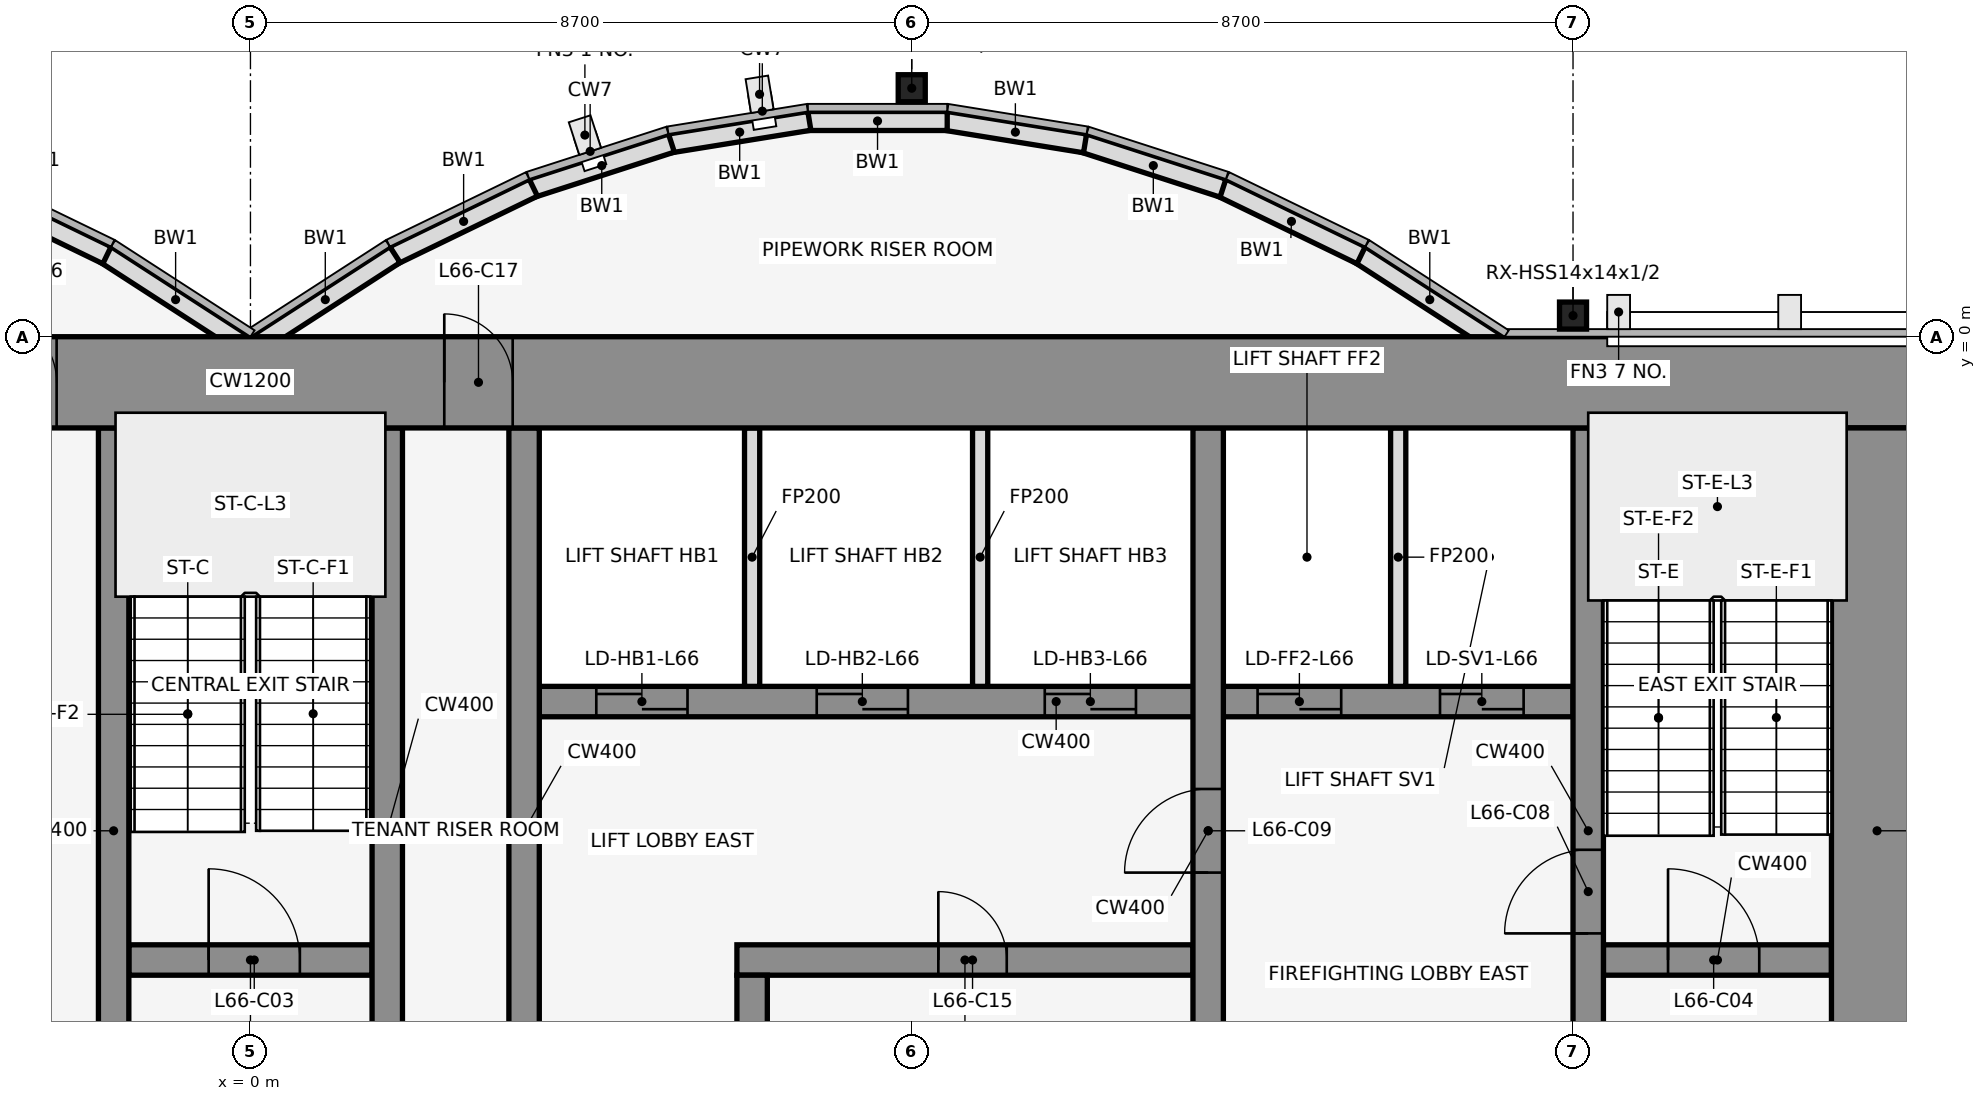
"""IFC4 building model, lengths in metres.
Left out: names, types, materials, properties, quantities, classifications, styles, units other than length and angle.
Written with IfcOpenShell. Run it as: python <this file> out.ifc"""

import sys

from ifc_helpers import new_model, si_unit, direction, frame, frame_2d, origin, origin_2d, place, context, subcontext, project, spatial, rectangle, hollow_rectangle, extrude, element, fill, save


model = new_model("IFC4")
c1 = context("Model", 3, precision=1e-05, world=origin(), true_north=direction((0.0, 1.0)))
c2 = subcontext(c1, "Body", "Model", "MODEL_VIEW")
j1 = project(units=[si_unit("LENGTHUNIT", "METRE"), si_unit("PLANEANGLEUNIT", "RADIAN")], contexts=[c1])
p1 = place(None, origin())
s1 = spatial("IfcSite", under=j1, at=p1, CompositionType="ELEMENT")
p2 = place(p1, origin())
s2 = spatial("IfcBuilding", under=s1, at=p2, CompositionType="ELEMENT")
p3 = place(p2, frame((0.0, 0.0, 293.0)))
s3 = spatial("IfcBuildingStorey", under=s2, at=p3, CompositionType="ELEMENT", Elevation=293.0)
for number, where, z_axis, x_axis in (
    (1, (8.7, 3.269, 0.0), (0.0, 0.0, 1.0), (1.0, 0.0, 0.0)),
    (2, (17.4, 0.278, 0.0), (0.0, 0.0, 1.0), (1.0, 0.0, 0.0)),
):
    element("IfcColumn", number, at=place(p3, frame(where, z_axis=z_axis, x_axis=x_axis)), inside=s3, PredefinedType="COLUMN", context=c2, shape_type="SweptSolid", body=[
        extrude(hollow_rectangle(XDim=0.356, YDim=0.356, WallThickness=0.012, at=origin_2d()), origin(), (0.0, 0.0, 1.0), 4.5),
    ])
p4 = place(p3, frame((16.432, -0.105, 0.0), z_axis=(0.0, 0.0, 1.0), x_axis=(-0.83981312244, 0.542875602121, 0.0)))
e3 = element("IfcWall", 3, at=p4, inside=s3, PredefinedType="STANDARD", context=c2, shape_type="SweptSolid", body=[
    extrude(rectangle(XDim=2.183, YDim=0.25, at=frame_2d((1.091, 0.0))), origin(), (0.0, 0.0, 1.0), 4.35),
])
p5 = place(p3, frame((14.612, 1.073, 0.0), z_axis=(0.0, 0.0, 1.0), x_axis=(-0.89982408427, 0.436252928206, 0.0)))
e4 = element("IfcWall", 4, at=p5, inside=s3, PredefinedType="STANDARD", context=c2, shape_type="SweptSolid", body=[
    extrude(rectangle(XDim=2.038, YDim=0.25, at=frame_2d((1.019, 0.0))), origin(), (0.0, 0.0, 1.0), 4.35),
])
p6 = place(p3, frame((12.795, 1.955, 0.0), z_axis=(0.0, 0.0, 1.0), x_axis=(-0.951495806175, 0.307661714928, 0.0)))
e5 = element("IfcWall", 5, at=p6, inside=s3, PredefinedType="STANDARD", context=c2, shape_type="SweptSolid", body=[
    extrude(rectangle(XDim=1.927, YDim=0.25, at=frame_2d((0.963, 0.0))), origin(), (0.0, 0.0, 1.0), 4.35),
])
p7 = place(p3, frame((10.98, 2.543, 0.0), z_axis=(0.0, 0.0, 1.0), x_axis=(-0.987181718931, 0.159600293885, 0.0)))
e6 = element("IfcWall", 6, at=p7, inside=s3, PredefinedType="STANDARD", context=c2, shape_type="SweptSolid", body=[
    extrude(rectangle(XDim=1.857, YDim=0.25, at=frame_2d((0.929, 0.0))), origin(), (0.0, 0.0, 1.0), 4.35),
])
p8 = place(p3, frame((9.167, 2.838, 0.0), z_axis=(0.0, 0.0, 1.0), x_axis=(-1.0, 0.0, 0.0)))
e7 = element("IfcWall", 7, at=p8, inside=s3, PredefinedType="STANDARD", context=c2, shape_type="SweptSolid", body=[
    extrude(rectangle(XDim=1.833, YDim=0.25, at=frame_2d((0.917, 0.0))), origin(), (0.0, 0.0, 1.0), 4.35),
])
p9 = place(p3, frame((7.353, 2.84, 0.0), z_axis=(0.0, 0.0, 1.0), x_axis=(-0.987181718931, -0.159600293885, 0.0)))
e8 = element("IfcWall", 8, at=p9, inside=s3, PredefinedType="STANDARD", context=c2, shape_type="SweptSolid", body=[
    extrude(rectangle(XDim=1.857, YDim=0.25, at=frame_2d((0.929, 0.0))), origin(), (0.0, 0.0, 1.0), 4.35),
])
p10 = place(p3, frame((5.538, 2.548, 0.0), z_axis=(0.0, 0.0, 1.0), x_axis=(-0.951495806175, -0.307661714928, 0.0)))
e9 = element("IfcWall", 9, at=p10, inside=s3, PredefinedType="STANDARD", context=c2, shape_type="SweptSolid", body=[
    extrude(rectangle(XDim=1.927, YDim=0.25, at=frame_2d((0.963, 0.0))), origin(), (0.0, 0.0, 1.0), 4.35),
])
p11 = place(p3, frame((3.721, 1.962, 0.0), z_axis=(0.0, 0.0, 1.0), x_axis=(-0.89982408427, -0.436252928206, 0.0)))
e10 = element("IfcWall", 10, at=p11, inside=s3, PredefinedType="STANDARD", context=c2, shape_type="SweptSolid", body=[
    extrude(rectangle(XDim=2.038, YDim=0.25, at=frame_2d((1.019, 0.0))), origin(), (0.0, 0.0, 1.0), 4.35),
])
for number, where, z_axis, x_axis in (
    (11, (1.901, 1.08, 0.0), (0.0, 0.0, 1.0), (-0.84, -0.543, 0.0)),
    (12, (-0.068, -0.105, 0.0), (0.0, 0.0, 1.0), (-0.84, 0.543, 0.0)),
):
    element("IfcWall", number, at=place(p3, frame(where, z_axis=z_axis, x_axis=x_axis)), inside=s3, PredefinedType="STANDARD", context=c2, shape_type="SweptSolid", body=[
        extrude(rectangle(XDim=2.183, YDim=0.25, at=frame_2d((1.091, 0.0))), origin(), (0.0, 0.0, 1.0), 4.35),
    ])
p12 = place(p3, frame((-1.888, 1.073, 0.0), z_axis=(0.0, 0.0, 1.0), x_axis=(-0.89982408427, 0.436252928206, 0.0)))
e13 = element("IfcWall", 13, at=p12, inside=s3, PredefinedType="STANDARD", context=c2, shape_type="SweptSolid", body=[
    extrude(rectangle(XDim=2.038, YDim=0.25, at=frame_2d((1.019, 0.0))), origin(), (0.0, 0.0, 1.0), 4.35),
])
p13 = place(p3, frame((-1.6, -8.2, 0.0), z_axis=(0.0, 0.0, 1.0), x_axis=(1.0, 0.0, 0.0)))
e14 = element("IfcWall", 14, at=p13, inside=s3, PredefinedType="SHEAR", context=c2, shape_type="SweptSolid", body=[
    extrude(rectangle(XDim=3.2, YDim=0.4, at=frame_2d((1.6, 0.0))), origin(), (0.0, 0.0, 1.0), 4.5),
])
p14 = place(p13, frame((1.05, 0.0, 0.0)))
e15 = element("IfcOpeningElement", 15, at=p14, cuts=e14, PredefinedType="OPENING", context=c2, shape_type="SweptSolid", body=[
    extrude(rectangle(XDim=1.2, YDim=2.1, at=frame_2d((0.6, 1.05))), frame((0.0, 0.212, 0.0), z_axis=(0.0, -1.0, 0.0), x_axis=(1.0, 0.0, 0.0)), (0.0, 0.0, 1.0), 0.424),
])
p15 = place(p3, frame((6.4, -8.2, 0.0), z_axis=(0.0, 0.0, 1.0), x_axis=(1.0, 0.0, 0.0)))
e16 = element("IfcWall", 16, at=p15, inside=s3, PredefinedType="SHEAR", context=c2, shape_type="SweptSolid", body=[
    extrude(rectangle(XDim=6.0, YDim=0.4, at=frame_2d((3.0, 0.0))), origin(), (0.0, 0.0, 1.0), 4.5),
])
p16 = place(p15, frame((2.65, 0.0, 0.0)))
e17 = element("IfcOpeningElement", 17, at=p16, cuts=e16, PredefinedType="OPENING", context=c2, shape_type="SweptSolid", body=[
    extrude(rectangle(XDim=0.9, YDim=2.1, at=frame_2d((0.45, 1.05))), frame((0.0, 0.212, 0.0), z_axis=(0.0, -1.0, 0.0), x_axis=(1.0, 0.0, 0.0)), (0.0, 0.0, 1.0), 0.424),
])
p17 = place(p3, frame((17.8, -8.2, 0.0), z_axis=(0.0, 0.0, 1.0), x_axis=(1.0, 0.0, 0.0)))
e18 = element("IfcWall", 18, at=p17, inside=s3, PredefinedType="SHEAR", context=c2, shape_type="SweptSolid", body=[
    extrude(rectangle(XDim=3.0, YDim=0.4, at=frame_2d((1.5, 0.0))), origin(), (0.0, 0.0, 1.0), 4.5),
])
p18 = place(p17, frame((0.85, 0.0, 0.0)))
e19 = element("IfcOpeningElement", 19, at=p18, cuts=e18, PredefinedType="OPENING", context=c2, shape_type="SweptSolid", body=[
    extrude(rectangle(XDim=1.2, YDim=2.1, at=frame_2d((0.6, 1.05))), frame((0.0, 0.212, 0.0), z_axis=(0.0, -1.0, 0.0), x_axis=(1.0, 0.0, 0.0)), (0.0, 0.0, 1.0), 0.424),
])
p19 = place(p3, frame((3.8, -4.8, 0.0), z_axis=(0.0, 0.0, 1.0), x_axis=(1.0, 0.0, 0.0)))
e20 = element("IfcWall", 20, at=p19, inside=s3, PredefinedType="SHEAR", context=c2, shape_type="SweptSolid", body=[
    extrude(rectangle(XDim=13.6, YDim=0.4, at=frame_2d((6.8, 0.0))), origin(), (0.0, 0.0, 1.0), 4.5),
])
p20 = place(p19, frame((0.75, 0.0, 0.0)))
e21 = element("IfcOpeningElement", 21, at=p20, cuts=e20, PredefinedType="OPENING", context=c2, shape_type="SweptSolid", body=[
    extrude(rectangle(XDim=1.2, YDim=2.1, at=frame_2d((0.6, 1.05))), frame((0.0, 0.212, 0.0), z_axis=(0.0, -1.0, 0.0), x_axis=(1.0, 0.0, 0.0)), (0.0, 0.0, 1.0), 0.424),
])
p21 = place(p19, frame((3.65, 0.0, 0.0)))
e22 = element("IfcOpeningElement", 22, at=p21, cuts=e20, PredefinedType="OPENING", context=c2, shape_type="SweptSolid", body=[
    extrude(rectangle(XDim=1.2, YDim=2.1, at=frame_2d((0.6, 1.05))), frame((0.0, 0.212, 0.0), z_axis=(0.0, -1.0, 0.0), x_axis=(1.0, 0.0, 0.0)), (0.0, 0.0, 1.0), 0.424),
])
p22 = place(p19, frame((6.65, 0.0, 0.0)))
e23 = element("IfcOpeningElement", 23, at=p22, cuts=e20, PredefinedType="OPENING", context=c2, shape_type="SweptSolid", body=[
    extrude(rectangle(XDim=1.2, YDim=2.1, at=frame_2d((0.6, 1.05))), frame((0.0, 0.212, 0.0), z_axis=(0.0, -1.0, 0.0), x_axis=(1.0, 0.0, 0.0)), (0.0, 0.0, 1.0), 0.424),
])
p23 = place(p19, frame((9.45, 0.0, 0.0)))
e24 = element("IfcOpeningElement", 24, at=p23, cuts=e20, PredefinedType="OPENING", context=c2, shape_type="SweptSolid", body=[
    extrude(rectangle(XDim=1.1, YDim=2.1, at=frame_2d((0.55, 1.05))), frame((0.0, 0.212, 0.0), z_axis=(0.0, -1.0, 0.0), x_axis=(1.0, 0.0, 0.0)), (0.0, 0.0, 1.0), 0.424),
])
p24 = place(p19, frame((11.85, 0.0, 0.0)))
e25 = element("IfcOpeningElement", 25, at=p24, cuts=e20, PredefinedType="OPENING", context=c2, shape_type="SweptSolid", body=[
    extrude(rectangle(XDim=1.1, YDim=2.1, at=frame_2d((0.55, 1.05))), frame((0.0, 0.212, 0.0), z_axis=(0.0, -1.0, 0.0), x_axis=(1.0, 0.0, 0.0)), (0.0, 0.0, 1.0), 0.424),
])
for number, where, z_axis, x_axis in (
    (26, (-1.8, -11.8, 0.0), (0.0, 0.0, 1.0), (0.0, 1.0, 0.0)),
    (27, (1.8, -11.8, 0.0), (0.0, 0.0, 1.0), (0.0, 1.0, 0.0)),
):
    element("IfcWall", number, at=place(p3, frame(where, z_axis=z_axis, x_axis=x_axis)), inside=s3, PredefinedType="SHEAR", context=c2, shape_type="SweptSolid", body=[
        extrude(rectangle(XDim=10.6, YDim=0.4, at=frame_2d((5.3, 0.0))), origin(), (0.0, 0.0, 1.0), 4.5),
    ])
p25 = place(p3, frame((3.6, -11.8, 0.0), z_axis=(0.0, 0.0, 1.0), x_axis=(0.0, 1.0, 0.0)))
e28 = element("IfcWall", 28, at=p25, inside=s3, PredefinedType="SHEAR", context=c2, shape_type="SweptSolid", body=[
    extrude(rectangle(XDim=10.6, YDim=0.4, at=frame_2d((5.3, 0.0))), origin(), (0.0, 0.0, 1.0), 4.5),
])
p26 = place(p25, frame((1.35, 0.0, 0.0)))
e29 = element("IfcOpeningElement", 29, at=p26, cuts=e28, PredefinedType="OPENING", context=c2, shape_type="SweptSolid", body=[
    extrude(rectangle(XDim=0.9, YDim=2.1, at=frame_2d((0.45, 1.05))), frame((0.0, 0.212, 0.0), z_axis=(0.0, -1.0, 0.0), x_axis=(1.0, 0.0, 0.0)), (0.0, 0.0, 1.0), 0.424),
])
p27 = place(p3, frame((6.6, -11.8, 0.0), z_axis=(0.0, 0.0, 1.0), x_axis=(0.0, 1.0, 0.0)))
e30 = element("IfcWall", 30, at=p27, inside=s3, PredefinedType="SHEAR", context=c2, shape_type="SweptSolid", body=[
    extrude(rectangle(XDim=3.4, YDim=0.4, at=frame_2d((1.7, 0.0))), origin(), (0.0, 0.0, 1.0), 4.5),
])
for number, where, z_axis, x_axis in (
    (31, (6.6, -4.6, 0.0), (0.0, 0.0, 1.0), (0.0, 1.0, 0.0)),
    (32, (9.6, -4.6, 0.0), (0.0, 0.0, 1.0), (0.0, 1.0, 0.0)),
):
    element("IfcWall", number, at=place(p3, frame(where, z_axis=z_axis, x_axis=x_axis)), inside=s3, PredefinedType="PARTITIONING", context=c2, shape_type="SweptSolid", body=[
        extrude(rectangle(XDim=3.4, YDim=0.2, at=frame_2d((1.7, 0.0))), origin(), (0.0, 0.0, 1.0), 3.418),
    ])
p28 = place(p3, frame((12.6, -11.8, 0.0), z_axis=(0.0, 0.0, 1.0), x_axis=(0.0, 1.0, 0.0)))
e33 = element("IfcWall", 33, at=p28, inside=s3, PredefinedType="SHEAR", context=c2, shape_type="SweptSolid", body=[
    extrude(rectangle(XDim=10.6, YDim=0.4, at=frame_2d((5.3, 0.0))), origin(), (0.0, 0.0, 1.0), 4.5),
])
p29 = place(p28, frame((4.75, 0.0, 0.0)))
e34 = element("IfcOpeningElement", 34, at=p29, cuts=e33, PredefinedType="OPENING", context=c2, shape_type="SweptSolid", body=[
    extrude(rectangle(XDim=1.1, YDim=2.1, at=frame_2d((0.55, 1.05))), frame((0.0, 0.212, 0.0), z_axis=(0.0, -1.0, 0.0), x_axis=(1.0, 0.0, 0.0)), (0.0, 0.0, 1.0), 0.424),
])
p30 = place(p3, frame((15.1, -4.6, 0.0), z_axis=(0.0, 0.0, 1.0), x_axis=(0.0, 1.0, 0.0)))
e35 = element("IfcWall", 35, at=p30, inside=s3, PredefinedType="PARTITIONING", context=c2, shape_type="SweptSolid", body=[
    extrude(rectangle(XDim=3.4, YDim=0.2, at=frame_2d((1.7, 0.0))), origin(), (0.0, 0.0, 1.0), 3.418),
])
p31 = place(p3, frame((17.6, -11.8, 0.0), z_axis=(0.0, 0.0, 1.0), x_axis=(0.0, 1.0, 0.0)))
e36 = element("IfcWall", 36, at=p31, inside=s3, PredefinedType="SHEAR", context=c2, shape_type="SweptSolid", body=[
    extrude(rectangle(XDim=10.6, YDim=0.4, at=frame_2d((5.3, 0.0))), origin(), (0.0, 0.0, 1.0), 4.5),
])
p32 = place(p31, frame((1.25, 0.0, 0.0)))
e37 = element("IfcOpeningElement", 37, at=p32, cuts=e36, PredefinedType="OPENING", context=c2, shape_type="SweptSolid", body=[
    extrude(rectangle(XDim=1.1, YDim=2.1, at=frame_2d((0.55, 1.05))), frame((0.0, 0.212, 0.0), z_axis=(0.0, -1.0, 0.0), x_axis=(1.0, 0.0, 0.0)), (0.0, 0.0, 1.0), 0.424),
])
p33 = place(p31, frame((3.95, 0.0, 0.0)))
e38 = element("IfcOpeningElement", 38, at=p33, cuts=e36, PredefinedType="OPENING", context=c2, shape_type="SweptSolid", body=[
    extrude(rectangle(XDim=1.1, YDim=2.1, at=frame_2d((0.55, 1.05))), frame((0.0, 0.212, 0.0), z_axis=(0.0, -1.0, 0.0), x_axis=(1.0, 0.0, 0.0)), (0.0, 0.0, 1.0), 0.424),
])
p34 = place(p3, frame((-22.0, -0.6, 0.0), z_axis=(0.0, 0.0, 1.0), x_axis=(1.0, 0.0, 0.0)))
e39 = element("IfcWall", 39, at=p34, inside=s3, PredefinedType="SHEAR", context=c2, shape_type="SweptSolid", body=[
    extrude(rectangle(XDim=44.0, YDim=1.2, at=frame_2d((22.0, 0.0))), origin(), (0.0, 0.0, 1.0), 4.5),
])
p35 = place(p34, frame((18.55, 0.0, 0.0)))
e40 = element("IfcOpeningElement", 40, at=p35, cuts=e39, PredefinedType="OPENING", context=c2, shape_type="SweptSolid", body=[
    extrude(rectangle(XDim=0.9, YDim=2.1, at=frame_2d((0.45, 1.05))), frame((0.0, 0.612, 0.0), z_axis=(0.0, -1.0, 0.0), x_axis=(1.0, 0.0, 0.0)), (0.0, 0.0, 1.0), 1.224),
])
p36 = place(p34, frame((24.55, 0.0, 0.0)))
e41 = element("IfcOpeningElement", 41, at=p36, cuts=e39, PredefinedType="OPENING", context=c2, shape_type="SweptSolid", body=[
    extrude(rectangle(XDim=0.9, YDim=2.1, at=frame_2d((0.45, 1.05))), frame((0.0, 0.612, 0.0), z_axis=(0.0, -1.0, 0.0), x_axis=(1.0, 0.0, 0.0)), (0.0, 0.0, 1.0), 1.224),
])
p37 = place(p3, frame((21.4, -11.8, 0.0), z_axis=(0.0, 0.0, 1.0), x_axis=(0.0, 1.0, 0.0)))
e42 = element("IfcWall", 42, at=p37, inside=s3, PredefinedType="SHEAR", context=c2, shape_type="SweptSolid", body=[
    extrude(rectangle(XDim=10.6, YDim=1.2, at=frame_2d((5.3, 0.0))), origin(), (0.0, 0.0, 1.0), 4.5),
])
p38 = place(p14, origin())
e43 = element("IfcDoor", 43, at=p38, inside=s3, OperationType="SINGLE_SWING_LEFT", PredefinedType="DOOR", context=c2, shape_type="SweptSolid", body=[
    extrude(rectangle(XDim=1.2, YDim=2.1, at=frame_2d((0.6, 1.05))), frame((0.0, 0.025, 0.0), z_axis=(0.0, -1.0, 0.0), x_axis=(1.0, 0.0, 0.0)), (0.0, 0.0, 1.0), 0.05),
])
fill(e15, e43)
p39 = place(p18, origin())
e44 = element("IfcDoor", 44, at=p39, inside=s3, OperationType="SINGLE_SWING_RIGHT", PredefinedType="DOOR", context=c2, shape_type="SweptSolid", body=[
    extrude(rectangle(XDim=1.2, YDim=2.1, at=frame_2d((0.6, 1.05))), frame((0.0, 0.025, 0.0), z_axis=(0.0, -1.0, 0.0), x_axis=(1.0, 0.0, 0.0)), (0.0, 0.0, 1.0), 0.05),
])
fill(e19, e44)
p40 = place(p20, origin())
e45 = element("IfcDoor", 45, at=p40, inside=s3, OperationType="DOUBLE_DOOR_SLIDING", PredefinedType="DOOR", context=c2, shape_type="SweptSolid", body=[
    extrude(rectangle(XDim=1.2, YDim=2.1, at=frame_2d((0.6, 1.05))), frame((0.0, 0.025, 0.0), z_axis=(0.0, -1.0, 0.0), x_axis=(1.0, 0.0, 0.0)), (0.0, 0.0, 1.0), 0.05),
])
fill(e21, e45)
p41 = place(p21, origin())
e46 = element("IfcDoor", 46, at=p41, inside=s3, OperationType="DOUBLE_DOOR_SLIDING", PredefinedType="DOOR", context=c2, shape_type="SweptSolid", body=[
    extrude(rectangle(XDim=1.2, YDim=2.1, at=frame_2d((0.6, 1.05))), frame((0.0, 0.025, 0.0), z_axis=(0.0, -1.0, 0.0), x_axis=(1.0, 0.0, 0.0)), (0.0, 0.0, 1.0), 0.05),
])
fill(e22, e46)
p42 = place(p22, origin())
e47 = element("IfcDoor", 47, at=p42, inside=s3, OperationType="DOUBLE_DOOR_SLIDING", PredefinedType="DOOR", context=c2, shape_type="SweptSolid", body=[
    extrude(rectangle(XDim=1.2, YDim=2.1, at=frame_2d((0.6, 1.05))), frame((0.0, 0.025, 0.0), z_axis=(0.0, -1.0, 0.0), x_axis=(1.0, 0.0, 0.0)), (0.0, 0.0, 1.0), 0.05),
])
fill(e23, e47)
p43 = place(p23, origin())
e48 = element("IfcDoor", 48, at=p43, inside=s3, OperationType="DOUBLE_DOOR_SLIDING", PredefinedType="DOOR", context=c2, shape_type="SweptSolid", body=[
    extrude(rectangle(XDim=1.1, YDim=2.1, at=frame_2d((0.55, 1.05))), frame((0.0, 0.025, 0.0), z_axis=(0.0, -1.0, 0.0), x_axis=(1.0, 0.0, 0.0)), (0.0, 0.0, 1.0), 0.05),
])
fill(e24, e48)
p44 = place(p24, origin())
e49 = element("IfcDoor", 49, at=p44, inside=s3, OperationType="DOUBLE_DOOR_SLIDING", PredefinedType="DOOR", context=c2, shape_type="SweptSolid", body=[
    extrude(rectangle(XDim=1.1, YDim=2.1, at=frame_2d((0.55, 1.05))), frame((0.0, 0.025, 0.0), z_axis=(0.0, -1.0, 0.0), x_axis=(1.0, 0.0, 0.0)), (0.0, 0.0, 1.0), 0.05),
])
fill(e25, e49)
p45 = place(p33, origin())
e50 = element("IfcDoor", 50, at=p45, inside=s3, OperationType="SINGLE_SWING_RIGHT", PredefinedType="DOOR", context=c2, shape_type="SweptSolid", body=[
    extrude(rectangle(XDim=1.1, YDim=2.1, at=frame_2d((0.55, 1.05))), frame((0.0, 0.025, 0.0), z_axis=(0.0, -1.0, 0.0), x_axis=(1.0, 0.0, 0.0)), (0.0, 0.0, 1.0), 0.05),
])
fill(e38, e50)
p46 = place(p29, frame((1.1, 0.0, 0.0), z_axis=(0.0, 0.0, 1.0), x_axis=(-1.0, 0.0, 0.0)))
e51 = element("IfcDoor", 51, at=p46, inside=s3, OperationType="SINGLE_SWING_RIGHT", PredefinedType="DOOR", context=c2, shape_type="SweptSolid", body=[
    extrude(rectangle(XDim=1.1, YDim=2.1, at=frame_2d((0.55, 1.05))), frame((0.0, 0.025, 0.0), z_axis=(0.0, -1.0, 0.0), x_axis=(1.0, 0.0, 0.0)), (0.0, 0.0, 1.0), 0.05),
])
fill(e34, e51)
p47 = place(p16, frame((0.9, 0.0, 0.0), z_axis=(0.0, 0.0, 1.0), x_axis=(-1.0, 0.0, 0.0)))
e52 = element("IfcDoor", 52, at=p47, inside=s3, OperationType="SINGLE_SWING_RIGHT", PredefinedType="DOOR", context=c2, shape_type="SweptSolid", body=[
    extrude(rectangle(XDim=0.9, YDim=2.1, at=frame_2d((0.45, 1.05))), frame((0.0, 0.025, 0.0), z_axis=(0.0, -1.0, 0.0), x_axis=(1.0, 0.0, 0.0)), (0.0, 0.0, 1.0), 0.05),
])
fill(e17, e52)
p48 = place(p35, origin())
e53 = element("IfcDoor", 53, at=p48, inside=s3, OperationType="SINGLE_SWING_LEFT", PredefinedType="DOOR", context=c2, shape_type="SweptSolid", body=[
    extrude(rectangle(XDim=0.9, YDim=2.1, at=frame_2d((0.45, 1.05))), frame((0.0, 0.025, 0.0), z_axis=(0.0, -1.0, 0.0), x_axis=(1.0, 0.0, 0.0)), (0.0, 0.0, 1.0), 0.05),
])
fill(e40, e53)
p49 = place(p36, origin())
e54 = element("IfcDoor", 54, at=p49, inside=s3, OperationType="SINGLE_SWING_LEFT", PredefinedType="DOOR", context=c2, shape_type="SweptSolid", body=[
    extrude(rectangle(XDim=0.9, YDim=2.1, at=frame_2d((0.45, 1.05))), frame((0.0, 0.025, 0.0), z_axis=(0.0, -1.0, 0.0), x_axis=(1.0, 0.0, 0.0)), (0.0, 0.0, 1.0), 0.05),
])
fill(e41, e54)
save(model, sys.argv[1])
